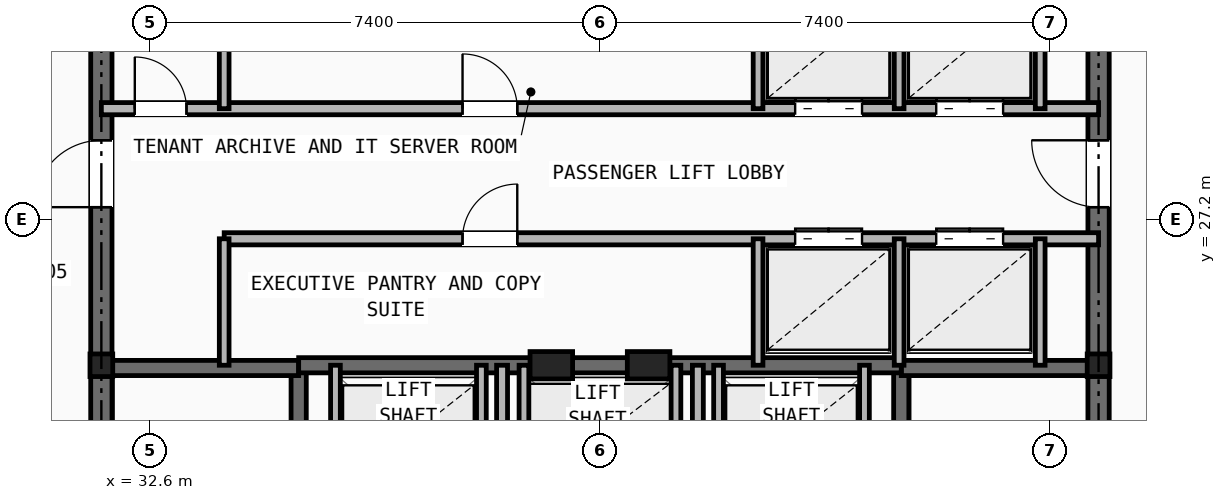
"""IFC4 building model, lengths in metres.
Left out: names, types, materials, properties, quantities, classifications, styles, units other than length and angle.
Written with IfcOpenShell. Run it as: python <this file> out.ifc"""

import sys

from ifc_helpers import new_model, si_unit, direction, frame, frame_2d, origin, origin_2d, place, context, subcontext, project, spatial, rectangle, i_section, extrude, element, fill, save


model = new_model("IFC4")
c1 = context("Model", 3, precision=1e-05, world=origin(), true_north=direction((0.0, 1.0)))
c2 = subcontext(c1, "Body", "Model", "MODEL_VIEW")
j1 = project(units=[si_unit("LENGTHUNIT", "METRE"), si_unit("PLANEANGLEUNIT", "RADIAN")], contexts=[c1])
p1 = place(None, origin())
s1 = spatial("IfcSite", under=j1, at=p1, CompositionType="ELEMENT")
p2 = place(p1, origin())
s2 = spatial("IfcBuilding", under=s1, at=p2, CompositionType="ELEMENT")
p3 = place(p2, frame((0.0, 0.0, 279.5)))
s3 = spatial("IfcBuildingStorey", under=s2, at=p3, CompositionType="ELEMENT", Elevation=279.5)
for number, where, z_axis, x_axis in (
    (1, (31.8, 24.8, 0.0), (0.0, 0.0, 1.0), (1.0, 0.0, 0.0)),
    (2, (48.2, 24.8, 0.0), (0.0, 0.0, 1.0), (1.0, 0.0, 0.0)),
):
    element("IfcColumn", number, at=place(p3, frame(where, z_axis=z_axis, x_axis=x_axis)), inside=s3, PredefinedType="COLUMN", context=c2, shape_type="SweptSolid", body=[
        extrude(i_section(OverallWidth=0.374, OverallDepth=0.372, WebThickness=0.016, FlangeThickness=0.026, at=origin_2d()), origin(), (0.0, 0.0, 1.0), 3.5),
    ])
for number, where, z_axis, x_axis in (
    (3, (39.2, 24.8, 0.0), (0.0, 0.0, 1.0), (1.0, 0.0, 0.0)),
    (4, (40.8, 24.8, 0.0), (0.0, 0.0, 1.0), (1.0, 0.0, 0.0)),
):
    element("IfcColumn", number, at=place(p3, frame(where, z_axis=z_axis, x_axis=x_axis)), inside=s3, PredefinedType="PILASTER", context=c2, shape_type="SweptSolid", body=[
        extrude(rectangle(XDim=0.7, YDim=0.45, at=origin_2d()), origin(), (0.0, 0.0, 1.0), 3.5),
    ])
p4 = place(p3, frame((31.8, 16.4, 0.0), z_axis=(0.0, 0.0, 1.0), x_axis=(0.0, 1.0, 0.0)))
e5 = element("IfcWall", 5, at=p4, inside=s3, PredefinedType="SHEAR", context=c2, shape_type="SweptSolid", body=[
    extrude(rectangle(XDim=14.8, YDim=0.35, at=frame_2d((7.4, 0.0))), origin(), (0.0, 0.0, 1.0), 3.25),
])
p5 = place(p4, frame((11.0, 0.0, 0.0)))
e6 = element("IfcOpeningElement", 6, at=p5, cuts=e5, PredefinedType="OPENING", context=c2, shape_type="SweptSolid", body=[
    extrude(rectangle(XDim=1.1, YDim=2.15, at=frame_2d((0.55, 1.075))), frame((0.0, 0.185, 0.0), z_axis=(0.0, -1.0, 0.0), x_axis=(1.0, 0.0, 0.0)), (0.0, 0.0, 1.0), 0.37),
])
p6 = place(p3, frame((48.2, 16.4, 0.0), z_axis=(0.0, 0.0, 1.0), x_axis=(0.0, 1.0, 0.0)))
e7 = element("IfcWall", 7, at=p6, inside=s3, PredefinedType="SHEAR", context=c2, shape_type="SweptSolid", body=[
    extrude(rectangle(XDim=14.8, YDim=0.35, at=frame_2d((7.4, 0.0))), origin(), (0.0, 0.0, 1.0), 3.25),
])
p7 = place(p6, frame((11.0, 0.0, 0.0)))
e8 = element("IfcOpeningElement", 8, at=p7, cuts=e7, PredefinedType="OPENING", context=c2, shape_type="SweptSolid", body=[
    extrude(rectangle(XDim=1.1, YDim=2.15, at=frame_2d((0.55, 1.075))), frame((0.0, 0.185, 0.0), z_axis=(0.0, -1.0, 0.0), x_axis=(1.0, 0.0, 0.0)), (0.0, 0.0, 1.0), 0.37),
])
p8 = place(p3, frame((35.045, 16.4, 0.0), z_axis=(0.0, 0.0, 1.0), x_axis=(0.0, 1.0, 0.0)))
e9 = element("IfcWall", 9, at=p8, inside=s3, PredefinedType="SHEAR", context=c2, shape_type="SweptSolid", body=[
    extrude(rectangle(XDim=8.4, YDim=0.25, at=frame_2d((4.2, 0.0))), origin(), (0.0, 0.0, 1.0), 3.25),
])
p9 = place(p8, frame((0.45, 0.0, 0.0)))
e10 = element("IfcOpeningElement", 10, at=p9, cuts=e9, PredefinedType="OPENING", context=c2, shape_type="SweptSolid", body=[
    extrude(rectangle(XDim=0.95, YDim=2.1, at=frame_2d((0.475, 1.05))), frame((0.0, 0.135, 0.0), z_axis=(0.0, -1.0, 0.0), x_axis=(1.0, 0.0, 0.0)), (0.0, 0.0, 1.0), 0.27),
])
p10 = place(p3, frame((31.8, 24.755, 0.0), z_axis=(0.0, 0.0, 1.0), x_axis=(1.0, 0.0, 0.0)))
e11 = element("IfcWall", 11, at=p10, inside=s3, PredefinedType="SHEAR", context=c2, shape_type="SweptSolid", body=[
    extrude(rectangle(XDim=3.245, YDim=0.25, at=frame_2d((1.623, 0.0))), origin(), (0.0, 0.0, 1.0), 3.25),
])
p11 = place(p3, frame((44.955, 16.4, 0.0), z_axis=(0.0, 0.0, 1.0), x_axis=(0.0, 1.0, 0.0)))
e12 = element("IfcWall", 12, at=p11, inside=s3, PredefinedType="SHEAR", context=c2, shape_type="SweptSolid", body=[
    extrude(rectangle(XDim=8.4, YDim=0.25, at=frame_2d((4.2, 0.0))), origin(), (0.0, 0.0, 1.0), 3.25),
])
p12 = place(p11, frame((0.45, 0.0, 0.0)))
e13 = element("IfcOpeningElement", 13, at=p12, cuts=e12, PredefinedType="OPENING", context=c2, shape_type="SweptSolid", body=[
    extrude(rectangle(XDim=0.95, YDim=2.1, at=frame_2d((0.475, 1.05))), frame((0.0, 0.135, 0.0), z_axis=(0.0, -1.0, 0.0), x_axis=(1.0, 0.0, 0.0)), (0.0, 0.0, 1.0), 0.27),
])
p13 = place(p3, frame((44.955, 24.755, 0.0), z_axis=(0.0, 0.0, 1.0), x_axis=(1.0, 0.0, 0.0)))
e14 = element("IfcWall", 14, at=p13, inside=s3, PredefinedType="SHEAR", context=c2, shape_type="SweptSolid", body=[
    extrude(rectangle(XDim=3.245, YDim=0.25, at=frame_2d((1.623, 0.0))), origin(), (0.0, 0.0, 1.0), 3.25),
])
p14 = place(p3, frame((35.045, 24.8, 0.0), z_axis=(0.0, 0.0, 1.0), x_axis=(1.0, 0.0, 0.0)))
e15 = element("IfcWall", 15, at=p14, inside=s3, PredefinedType="SHEAR", context=c2, shape_type="SweptSolid", body=[
    extrude(rectangle(XDim=9.91, YDim=0.25, at=frame_2d((4.955, 0.0))), origin(), (0.0, 0.0, 1.0), 3.25),
])
p15 = place(p3, frame((38.39, 16.4, 0.0), z_axis=(0.0, 0.0, 1.0), x_axis=(0.0, 1.0, 0.0)))
e16 = element("IfcWall", 16, at=p15, inside=s3, PredefinedType="PARTITIONING", context=c2, shape_type="SweptSolid", body=[
    extrude(rectangle(XDim=8.4, YDim=0.18, at=frame_2d((4.2, 0.0))), origin(), (0.0, 0.0, 1.0), 2.705),
])
p16 = place(p15, frame((3.8, 0.0, 0.0)))
e17 = element("IfcOpeningElement", 17, at=p16, cuts=e16, PredefinedType="OPENING", context=c2, shape_type="SweptSolid", body=[
    extrude(rectangle(XDim=0.95, YDim=2.1, at=frame_2d((0.475, 1.05))), frame((0.0, 0.1, 0.0), z_axis=(0.0, -1.0, 0.0), x_axis=(1.0, 0.0, 0.0)), (0.0, 0.0, 1.0), 0.2),
])
p17 = place(p3, frame((41.61, 16.4, 0.0), z_axis=(0.0, 0.0, 1.0), x_axis=(0.0, 1.0, 0.0)))
e18 = element("IfcWall", 18, at=p17, inside=s3, PredefinedType="PARTITIONING", context=c2, shape_type="SweptSolid", body=[
    extrude(rectangle(XDim=8.4, YDim=0.18, at=frame_2d((4.2, 0.0))), origin(), (0.0, 0.0, 1.0), 2.705),
])
for number, where, z_axis, x_axis in (
    (19, (35.65, 22.48, 0.0), (0.0, 0.0, 1.0), (0.0, 1.0, 0.0)),
    (20, (38.05, 22.48, 0.0), (0.0, 0.0, 1.0), (0.0, 1.0, 0.0)),
    (21, (41.95, 22.48, 0.0), (0.0, 0.0, 1.0), (0.0, 1.0, 0.0)),
    (22, (44.35, 22.48, 0.0), (0.0, 0.0, 1.0), (0.0, 1.0, 0.0)),
    (23, (38.75, 22.48, 0.0), (0.0, 0.0, 1.0), (0.0, 1.0, 0.0)),
    (24, (41.25, 22.48, 0.0), (0.0, 0.0, 1.0), (0.0, 1.0, 0.0)),
):
    element("IfcWall", number, at=place(p3, frame(where, z_axis=z_axis, x_axis=x_axis)), inside=s3, PredefinedType="SOLIDWALL", context=c2, shape_type="SweptSolid", body=[
        extrude(rectangle(XDim=2.32, YDim=0.16, at=frame_2d((1.16, 0.0))), origin(), (0.0, 0.0, 1.0), 3.25),
    ])
p18 = place(p3, frame((31.8, 29.02, 0.0), z_axis=(0.0, 0.0, 1.0), x_axis=(1.0, 0.0, 0.0)))
e25 = element("IfcWall", 25, at=p18, inside=s3, PredefinedType="SOLIDWALL", context=c2, shape_type="SweptSolid", body=[
    extrude(rectangle(XDim=16.4, YDim=0.2, at=frame_2d((8.2, 0.0))), origin(), (0.0, 0.0, 1.0), 2.705),
])
p19 = place(p18, frame((0.55, 0.0, 0.0)))
e26 = element("IfcOpeningElement", 26, at=p19, cuts=e25, PredefinedType="OPENING", context=c2, shape_type="SweptSolid", body=[
    extrude(rectangle(XDim=0.85, YDim=2.05, at=frame_2d((0.425, 1.025))), frame((0.0, 0.11, 0.0), z_axis=(0.0, -1.0, 0.0), x_axis=(1.0, 0.0, 0.0)), (0.0, 0.0, 1.0), 0.22),
])
p20 = place(p18, frame((5.94, 0.0, 0.0)))
e27 = element("IfcOpeningElement", 27, at=p20, cuts=e25, PredefinedType="OPENING", context=c2, shape_type="SweptSolid", body=[
    extrude(rectangle(XDim=0.9, YDim=2.1, at=frame_2d((0.45, 1.05))), frame((0.0, 0.11, 0.0), z_axis=(0.0, -1.0, 0.0), x_axis=(1.0, 0.0, 0.0)), (0.0, 0.0, 1.0), 0.22),
])
p21 = place(p18, frame((11.41, 0.0, 0.0)))
e28 = element("IfcOpeningElement", 28, at=p21, cuts=e25, PredefinedType="OPENING", context=c2, shape_type="SweptSolid", body=[
    extrude(rectangle(XDim=1.1, YDim=2.15, at=frame_2d((0.55, 1.075))), frame((0.0, 0.11, 0.0), z_axis=(0.0, -1.0, 0.0), x_axis=(1.0, 0.0, 0.0)), (0.0, 0.0, 1.0), 0.22),
])
p22 = place(p18, frame((13.73, 0.0, 0.0)))
e29 = element("IfcOpeningElement", 29, at=p22, cuts=e25, PredefinedType="OPENING", context=c2, shape_type="SweptSolid", body=[
    extrude(rectangle(XDim=1.1, YDim=2.15, at=frame_2d((0.55, 1.075))), frame((0.0, 0.11, 0.0), z_axis=(0.0, -1.0, 0.0), x_axis=(1.0, 0.0, 0.0)), (0.0, 0.0, 1.0), 0.22),
])
p23 = place(p3, frame((33.82, 26.88, 0.0), z_axis=(0.0, 0.0, 1.0), x_axis=(1.0, 0.0, 0.0)))
e30 = element("IfcWall", 30, at=p23, inside=s3, PredefinedType="SOLIDWALL", context=c2, shape_type="SweptSolid", body=[
    extrude(rectangle(XDim=14.38, YDim=0.2, at=frame_2d((7.19, 0.0))), origin(), (0.0, 0.0, 1.0), 2.705),
])
p24 = place(p23, frame((3.92, 0.0, 0.0)))
e31 = element("IfcOpeningElement", 31, at=p24, cuts=e30, PredefinedType="OPENING", context=c2, shape_type="SweptSolid", body=[
    extrude(rectangle(XDim=0.9, YDim=2.1, at=frame_2d((0.45, 1.05))), frame((0.0, 0.11, 0.0), z_axis=(0.0, -1.0, 0.0), x_axis=(1.0, 0.0, 0.0)), (0.0, 0.0, 1.0), 0.22),
])
p25 = place(p23, frame((9.39, 0.0, 0.0)))
e32 = element("IfcOpeningElement", 32, at=p25, cuts=e30, PredefinedType="OPENING", context=c2, shape_type="SweptSolid", body=[
    extrude(rectangle(XDim=1.1, YDim=2.15, at=frame_2d((0.55, 1.075))), frame((0.0, 0.11, 0.0), z_axis=(0.0, -1.0, 0.0), x_axis=(1.0, 0.0, 0.0)), (0.0, 0.0, 1.0), 0.22),
])
p26 = place(p23, frame((11.71, 0.0, 0.0)))
e33 = element("IfcOpeningElement", 33, at=p26, cuts=e30, PredefinedType="OPENING", context=c2, shape_type="SweptSolid", body=[
    extrude(rectangle(XDim=1.1, YDim=2.15, at=frame_2d((0.55, 1.075))), frame((0.0, 0.11, 0.0), z_axis=(0.0, -1.0, 0.0), x_axis=(1.0, 0.0, 0.0)), (0.0, 0.0, 1.0), 0.22),
])
p27 = place(p3, frame((33.82, 29.02, 0.0), z_axis=(0.0, 0.0, 1.0), x_axis=(0.0, 1.0, 0.0)))
e34 = element("IfcWall", 34, at=p27, inside=s3, PredefinedType="SOLIDWALL", context=c2, shape_type="SweptSolid", body=[
    extrude(rectangle(XDim=2.18, YDim=0.16, at=frame_2d((1.09, 0.0))), origin(), (0.0, 0.0, 1.0), 2.705),
])
p28 = place(p3, frame((33.82, 24.8, 0.0), z_axis=(0.0, 0.0, 1.0), x_axis=(0.0, 1.0, 0.0)))
e35 = element("IfcWall", 35, at=p28, inside=s3, PredefinedType="SOLIDWALL", context=c2, shape_type="SweptSolid", body=[
    extrude(rectangle(XDim=2.08, YDim=0.16, at=frame_2d((1.04, 0.0))), origin(), (0.0, 0.0, 1.0), 3.25),
])
for number, where, z_axis, x_axis in (
    (36, (42.6, 29.02, 0.0), (0.0, 0.0, 1.0), (0.0, 1.0, 0.0)),
    (37, (44.92, 29.02, 0.0), (0.0, 0.0, 1.0), (0.0, 1.0, 0.0)),
    (38, (47.24, 29.02, 0.0), (0.0, 0.0, 1.0), (0.0, 1.0, 0.0)),
):
    element("IfcWall", number, at=place(p3, frame(where, z_axis=z_axis, x_axis=x_axis)), inside=s3, PredefinedType="SOLIDWALL", context=c2, shape_type="SweptSolid", body=[
        extrude(rectangle(XDim=2.18, YDim=0.16, at=frame_2d((1.09, 0.0))), origin(), (0.0, 0.0, 1.0), 2.705),
    ])
for number, where, z_axis, x_axis in (
    (39, (42.6, 24.8, 0.0), (0.0, 0.0, 1.0), (0.0, 1.0, 0.0)),
    (40, (44.92, 24.8, 0.0), (0.0, 0.0, 1.0), (0.0, 1.0, 0.0)),
    (41, (47.24, 24.8, 0.0), (0.0, 0.0, 1.0), (0.0, 1.0, 0.0)),
):
    element("IfcWall", number, at=place(p3, frame(where, z_axis=z_axis, x_axis=x_axis)), inside=s3, PredefinedType="SOLIDWALL", context=c2, shape_type="SweptSolid", body=[
        extrude(rectangle(XDim=2.08, YDim=0.16, at=frame_2d((1.04, 0.0))), origin(), (0.0, 0.0, 1.0), 3.25),
    ])
p29 = place(p19, origin())
e42 = element("IfcDoor", 42, at=p29, inside=s3, OperationType="SINGLE_SWING_LEFT", PredefinedType="DOOR", context=c2, shape_type="SweptSolid", body=[
    extrude(rectangle(XDim=0.85, YDim=2.05, at=frame_2d((0.425, 1.025))), frame((0.0, 0.025, 0.0), z_axis=(0.0, -1.0, 0.0), x_axis=(1.0, 0.0, 0.0)), (0.0, 0.0, 1.0), 0.05),
])
fill(e26, e42)
p30 = place(p5, origin())
e43 = element("IfcDoor", 43, at=p30, inside=s3, OperationType="SINGLE_SWING_LEFT", PredefinedType="DOOR", context=c2, shape_type="SweptSolid", body=[
    extrude(rectangle(XDim=1.1, YDim=2.15, at=frame_2d((0.55, 1.075))), frame((0.0, 0.025, 0.0), z_axis=(0.0, -1.0, 0.0), x_axis=(1.0, 0.0, 0.0)), (0.0, 0.0, 1.0), 0.05),
])
fill(e6, e43)
p31 = place(p7, origin())
e44 = element("IfcDoor", 44, at=p31, inside=s3, OperationType="SINGLE_SWING_RIGHT", PredefinedType="DOOR", context=c2, shape_type="SweptSolid", body=[
    extrude(rectangle(XDim=1.1, YDim=2.15, at=frame_2d((0.55, 1.075))), frame((0.0, 0.025, 0.0), z_axis=(0.0, -1.0, 0.0), x_axis=(1.0, 0.0, 0.0)), (0.0, 0.0, 1.0), 0.05),
])
fill(e8, e44)
p32 = place(p20, origin())
e45 = element("IfcDoor", 45, at=p32, inside=s3, OperationType="SINGLE_SWING_LEFT", PredefinedType="DOOR", context=c2, shape_type="SweptSolid", body=[
    extrude(rectangle(XDim=0.9, YDim=2.1, at=frame_2d((0.45, 1.05))), frame((0.0, 0.025, 0.0), z_axis=(0.0, -1.0, 0.0), x_axis=(1.0, 0.0, 0.0)), (0.0, 0.0, 1.0), 0.05),
])
fill(e27, e45)
p33 = place(p24, origin())
e46 = element("IfcDoor", 46, at=p33, inside=s3, OperationType="SINGLE_SWING_RIGHT", PredefinedType="DOOR", context=c2, shape_type="SweptSolid", body=[
    extrude(rectangle(XDim=0.9, YDim=2.1, at=frame_2d((0.45, 1.05))), frame((0.0, 0.025, 0.0), z_axis=(0.0, -1.0, 0.0), x_axis=(1.0, 0.0, 0.0)), (0.0, 0.0, 1.0), 0.05),
])
fill(e31, e46)
p34 = place(p21, origin())
e47 = element("IfcDoor", 47, at=p34, inside=s3, OperationType="DOUBLE_DOOR_SLIDING", PredefinedType="DOOR", context=c2, shape_type="SweptSolid", body=[
    extrude(rectangle(XDim=1.1, YDim=2.15, at=frame_2d((0.55, 1.075))), frame((0.0, 0.025, 0.0), z_axis=(0.0, -1.0, 0.0), x_axis=(1.0, 0.0, 0.0)), (0.0, 0.0, 1.0), 0.05),
])
fill(e28, e47)
p35 = place(p22, origin())
e48 = element("IfcDoor", 48, at=p35, inside=s3, OperationType="DOUBLE_DOOR_SLIDING", PredefinedType="DOOR", context=c2, shape_type="SweptSolid", body=[
    extrude(rectangle(XDim=1.1, YDim=2.15, at=frame_2d((0.55, 1.075))), frame((0.0, 0.025, 0.0), z_axis=(0.0, -1.0, 0.0), x_axis=(1.0, 0.0, 0.0)), (0.0, 0.0, 1.0), 0.05),
])
fill(e29, e48)
p36 = place(p25, origin())
e49 = element("IfcDoor", 49, at=p36, inside=s3, OperationType="DOUBLE_DOOR_SLIDING", PredefinedType="DOOR", context=c2, shape_type="SweptSolid", body=[
    extrude(rectangle(XDim=1.1, YDim=2.15, at=frame_2d((0.55, 1.075))), frame((0.0, 0.025, 0.0), z_axis=(0.0, -1.0, 0.0), x_axis=(1.0, 0.0, 0.0)), (0.0, 0.0, 1.0), 0.05),
])
fill(e32, e49)
p37 = place(p26, origin())
e50 = element("IfcDoor", 50, at=p37, inside=s3, OperationType="DOUBLE_DOOR_SLIDING", PredefinedType="DOOR", context=c2, shape_type="SweptSolid", body=[
    extrude(rectangle(XDim=1.1, YDim=2.15, at=frame_2d((0.55, 1.075))), frame((0.0, 0.025, 0.0), z_axis=(0.0, -1.0, 0.0), x_axis=(1.0, 0.0, 0.0)), (0.0, 0.0, 1.0), 0.05),
])
fill(e33, e50)
save(model, sys.argv[1])
